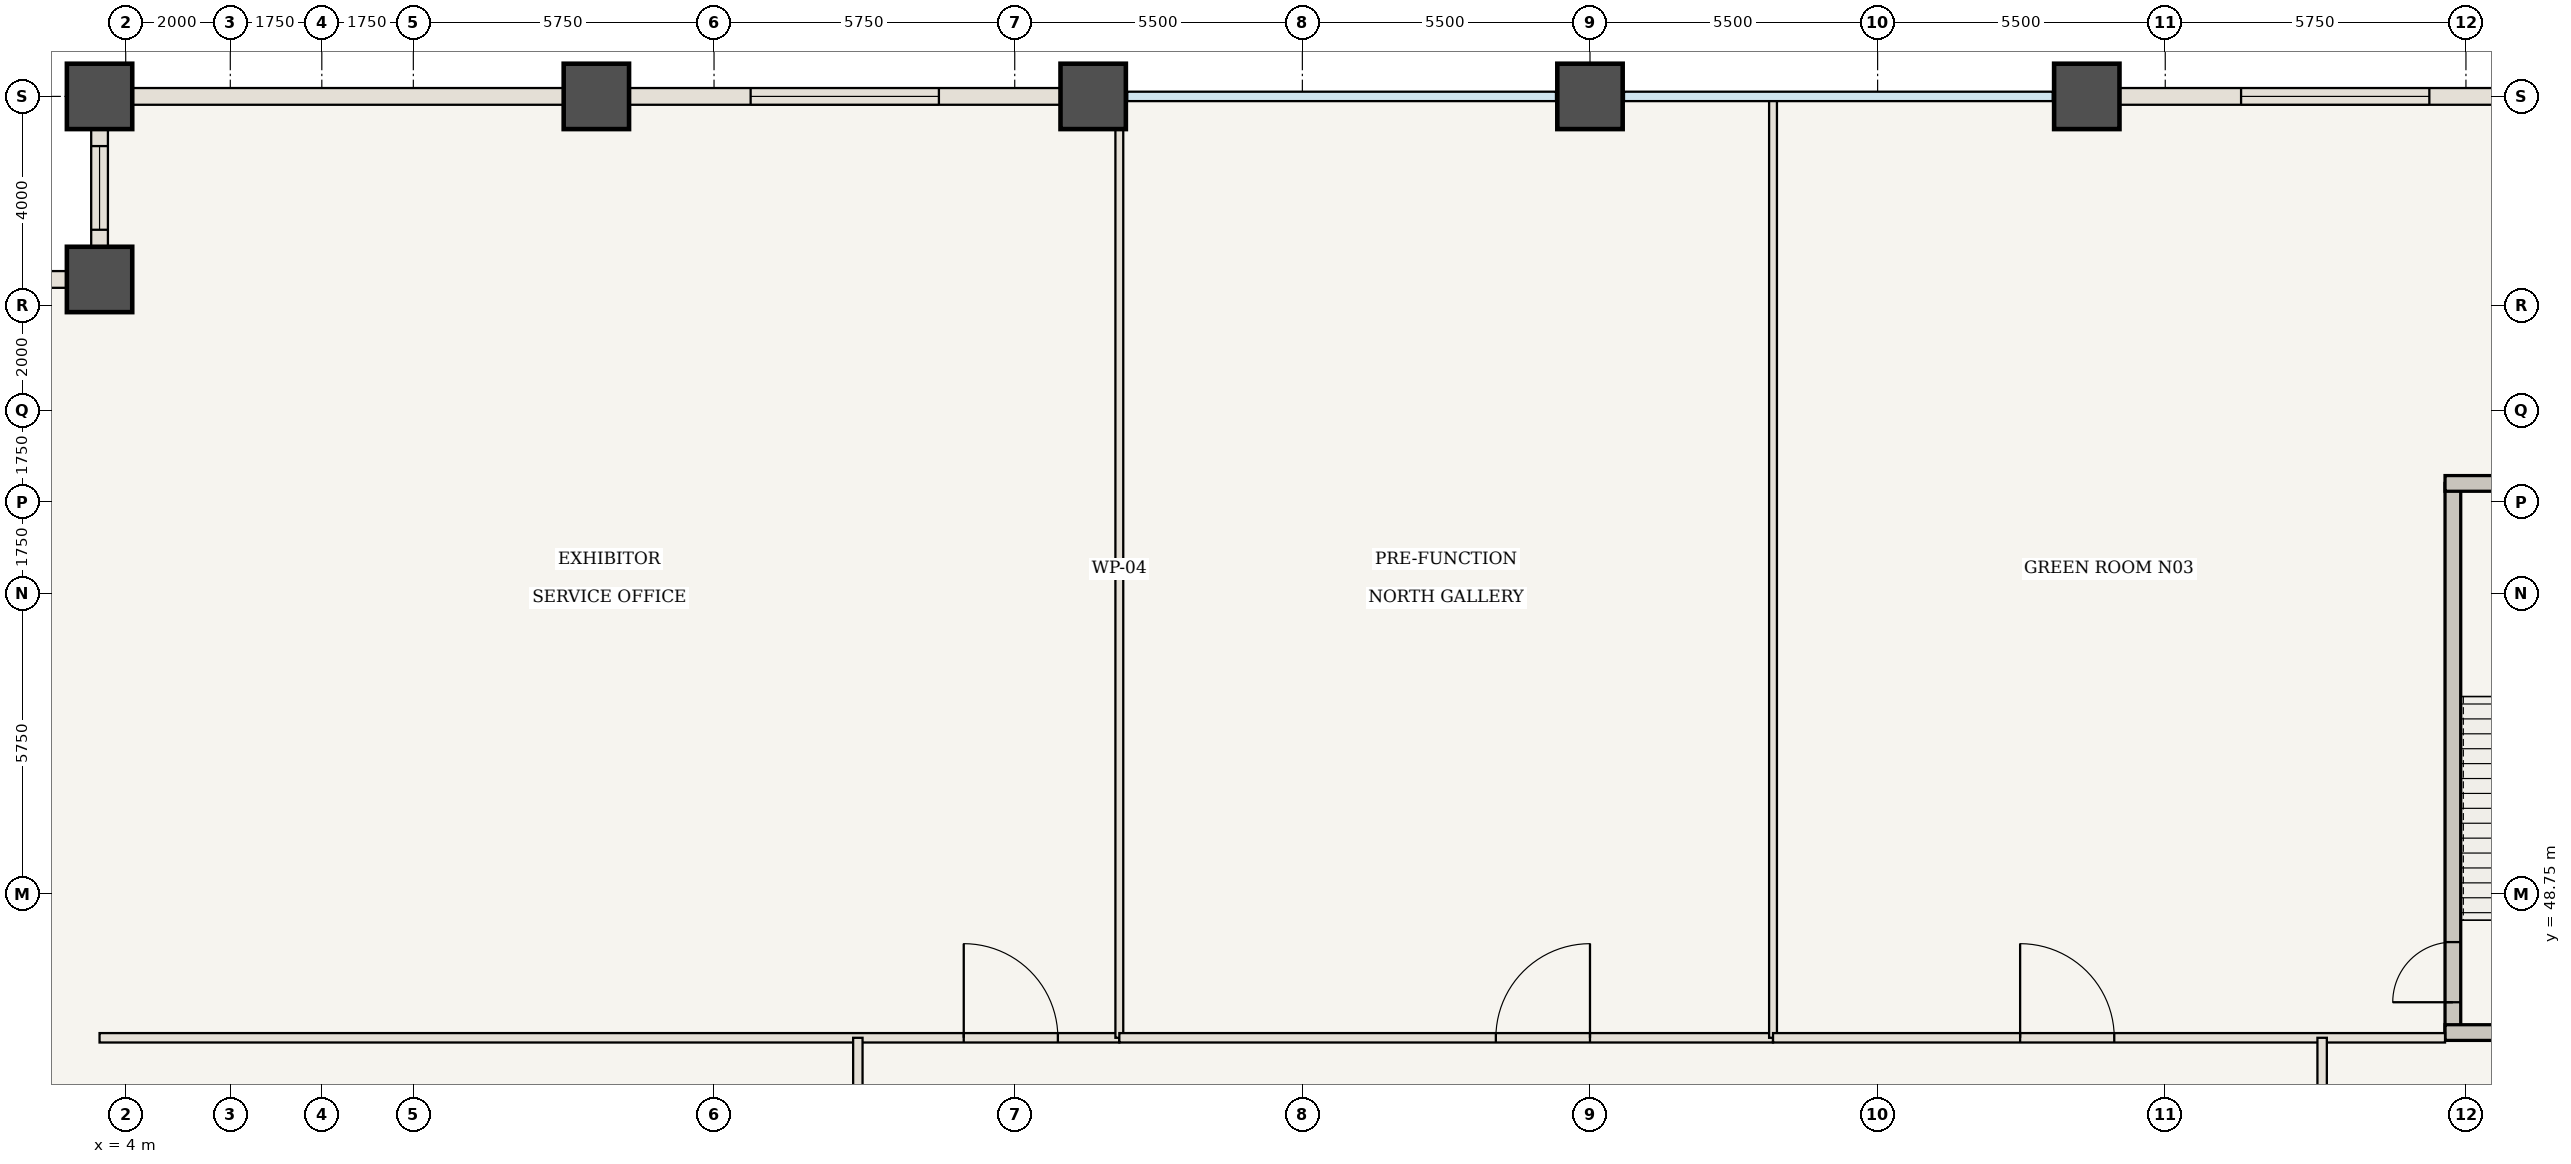
"""IFC4 building model, lengths in metres.
Left out: names, types, materials, properties, quantities, classifications, styles, units other than length and angle.
Written with IfcOpenShell. Run it as: python <this file> out.ifc"""

import sys

from ifc_helpers import new_model, si_unit, direction, frame, frame_2d, origin, origin_2d, place, context, subcontext, project, spatial, rectangle, extrude, element, fill, save


model = new_model("IFC4")
c1 = context("Model", 3, precision=1e-05, world=origin(), true_north=direction((0.0, 1.0)))
c2 = subcontext(c1, "Body", "Model", "MODEL_VIEW")
j1 = project(units=[si_unit("LENGTHUNIT", "METRE"), si_unit("PLANEANGLEUNIT", "RADIAN")], contexts=[c1])
p1 = place(None, origin())
s1 = spatial("IfcSite", under=j1, at=p1, CompositionType="ELEMENT")
p2 = place(p1, origin())
s2 = spatial("IfcBuilding", under=s1, at=p2, CompositionType="ELEMENT")
p3 = place(p2, frame((0.0, 0.0, 6.65)))
s3 = spatial("IfcBuildingStorey", under=s2, at=p3, CompositionType="ELEMENT", Elevation=6.65)
for number, where, z_axis, x_axis in (
    (1, (3.5, 64.0, 0.0), (0.0, 0.0, 1.0), (1.0, 0.0, 0.0)),
    (2, (3.5, 60.5, 0.0), (0.0, 0.0, 1.0), (1.0, 0.0, 0.0)),
    (3, (13.0, 64.0, 0.0), (0.0, 0.0, 1.0), (1.0, 0.0, 0.0)),
    (4, (22.5, 64.0, 0.0), (0.0, 0.0, 1.0), (1.0, 0.0, 0.0)),
    (5, (32.0, 64.0, 0.0), (0.0, 0.0, 1.0), (1.0, 0.0, 0.0)),
    (6, (41.5, 64.0, 0.0), (0.0, 0.0, 1.0), (1.0, 0.0, 0.0)),
):
    element("IfcColumn", number, at=place(p3, frame(where, z_axis=z_axis, x_axis=x_axis)), inside=s3, PredefinedType="COLUMN", context=c2, shape_type="SweptSolid", body=[
        extrude(rectangle(XDim=1.25, YDim=1.25, at=origin_2d()), origin(), (0.0, 0.0, 1.0), 5.6),
    ])
p4 = place(p3, frame((48.5, 46.1, 0.0), z_axis=(0.0, 0.0, 1.0), x_axis=(0.0, 1.0, 0.0)))
e7 = element("IfcWall", 7, at=p4, inside=s3, PredefinedType="SHEAR", context=c2, shape_type="SweptSolid", body=[
    extrude(rectangle(XDim=10.5, YDim=0.3, at=frame_2d((5.25, 0.0))), origin(), (0.0, 0.0, 1.0), 5.36),
])
p5 = place(p4, frame((0.58, 0.0, 0.0)))
e8 = element("IfcOpeningElement", 8, at=p5, cuts=e7, PredefinedType="OPENING", context=c2, shape_type="SweptSolid", body=[
    extrude(rectangle(XDim=1.15, YDim=2.15, at=frame_2d((0.575, 1.075))), frame((0.0, 0.16, 0.0), z_axis=(0.0, -1.0, 0.0), x_axis=(1.0, 0.0, 0.0)), (0.0, 0.0, 1.0), 0.32),
])
for number, where, z_axis, x_axis in (
    (9, (48.35, 46.1, 0.0), (0.0, 0.0, 1.0), (1.0, 0.0, 0.0)),
    (10, (48.35, 56.6, 0.0), (0.0, 0.0, 1.0), (1.0, 0.0, 0.0)),
):
    element("IfcWall", number, at=place(p3, frame(where, z_axis=z_axis, x_axis=x_axis)), inside=s3, PredefinedType="SHEAR", context=c2, shape_type="SweptSolid", body=[
        extrude(rectangle(XDim=4.75, YDim=0.3, at=frame_2d((2.375, 0.0))), origin(), (0.0, 0.0, 1.0), 5.36),
    ])
p6 = place(p3, frame((3.5, 46.0, 0.0), z_axis=(0.0, 0.0, 1.0), x_axis=(1.0, 0.0, 0.0)))
e11 = element("IfcWall", 11, at=p6, inside=s3, PredefinedType="STANDARD", context=c2, shape_type="SweptSolid", body=[
    extrude(rectangle(XDim=19.5, YDim=0.18, at=frame_2d((9.75, 0.0))), origin(), (0.0, 0.0, 1.0), 5.36),
])
p7 = place(p6, frame((16.525, 0.0, 0.0)))
e12 = element("IfcOpeningElement", 12, at=p7, cuts=e11, PredefinedType="OPENING", context=c2, shape_type="SweptSolid", body=[
    extrude(rectangle(XDim=1.8, YDim=2.35, at=frame_2d((0.9, 1.175))), frame((0.0, 0.1, 0.0), z_axis=(0.0, -1.0, 0.0), x_axis=(1.0, 0.0, 0.0)), (0.0, 0.0, 1.0), 0.2),
])
p8 = place(p3, frame((23.0, 46.0, 0.0), z_axis=(0.0, 0.0, 1.0), x_axis=(0.0, 1.0, 0.0)))
e13 = element("IfcWall", 13, at=p8, inside=s3, PredefinedType="STANDARD", context=c2, shape_type="SweptSolid", body=[
    extrude(rectangle(XDim=17.94, YDim=0.15, at=frame_2d((8.97, 0.0))), origin(), (0.0, 0.0, 1.0), 5.36),
])
p9 = place(p3, frame((23.0, 46.0, 0.0), z_axis=(0.0, 0.0, 1.0), x_axis=(1.0, 0.0, 0.0)))
e14 = element("IfcWall", 14, at=p9, inside=s3, PredefinedType="STANDARD", context=c2, shape_type="SweptSolid", body=[
    extrude(rectangle(XDim=12.5, YDim=0.18, at=frame_2d((6.25, 0.0))), origin(), (0.0, 0.0, 1.0), 5.36),
])
p10 = place(p9, frame((7.2, 0.0, 0.0)))
e15 = element("IfcOpeningElement", 15, at=p10, cuts=e14, PredefinedType="OPENING", context=c2, shape_type="SweptSolid", body=[
    extrude(rectangle(XDim=1.8, YDim=2.35, at=frame_2d((0.9, 1.175))), frame((0.0, 0.1, 0.0), z_axis=(0.0, -1.0, 0.0), x_axis=(1.0, 0.0, 0.0)), (0.0, 0.0, 1.0), 0.2),
])
p11 = place(p3, frame((35.5, 46.0, 0.0), z_axis=(0.0, 0.0, 1.0), x_axis=(0.0, 1.0, 0.0)))
e16 = element("IfcWall", 16, at=p11, inside=s3, PredefinedType="STANDARD", context=c2, shape_type="SweptSolid", body=[
    extrude(rectangle(XDim=17.94, YDim=0.15, at=frame_2d((8.97, 0.0))), origin(), (0.0, 0.0, 1.0), 5.36),
])
p12 = place(p3, frame((35.5, 46.0, 0.0), z_axis=(0.0, 0.0, 1.0), x_axis=(1.0, 0.0, 0.0)))
e17 = element("IfcWall", 17, at=p12, inside=s3, PredefinedType="STANDARD", context=c2, shape_type="SweptSolid", body=[
    extrude(rectangle(XDim=12.85, YDim=0.18, at=frame_2d((6.425, 0.0))), origin(), (0.0, 0.0, 1.0), 5.36),
])
p13 = place(p12, frame((4.725, 0.0, 0.0)))
e18 = element("IfcOpeningElement", 18, at=p13, cuts=e17, PredefinedType="OPENING", context=c2, shape_type="SweptSolid", body=[
    extrude(rectangle(XDim=1.8, YDim=2.35, at=frame_2d((0.9, 1.175))), frame((0.0, 0.1, 0.0), z_axis=(0.0, -1.0, 0.0), x_axis=(1.0, 0.0, 0.0)), (0.0, 0.0, 1.0), 0.2),
])
p14 = place(p3, frame((18.0, 31.2, 0.0), z_axis=(0.0, 0.0, 1.0), x_axis=(0.0, 1.0, 0.0)))
e19 = element("IfcWall", 19, at=p14, inside=s3, PredefinedType="STANDARD", context=c2, shape_type="SweptSolid", body=[
    extrude(rectangle(XDim=14.8, YDim=0.18, at=frame_2d((7.4, 0.0))), origin(), (0.0, 0.0, 1.0), 5.36),
])
p15 = place(p14, frame((6.9, 0.0, 0.0)))
e20 = element("IfcOpeningElement", 20, at=p15, cuts=e19, PredefinedType="OPENING", context=c2, shape_type="SweptSolid", body=[
    extrude(rectangle(XDim=0.95, YDim=2.15, at=frame_2d((0.475, 1.075))), frame((0.0, 0.1, 0.0), z_axis=(0.0, -1.0, 0.0), x_axis=(1.0, 0.0, 0.0)), (0.0, 0.0, 1.0), 0.2),
])
p16 = place(p3, frame((46.0, 32.8, 0.0), z_axis=(0.0, 0.0, 1.0), x_axis=(0.0, 1.0, 0.0)))
e21 = element("IfcWall", 21, at=p16, inside=s3, PredefinedType="STANDARD", context=c2, shape_type="SweptSolid", body=[
    extrude(rectangle(XDim=13.2, YDim=0.18, at=frame_2d((6.6, 0.0))), origin(), (0.0, 0.0, 1.0), 5.36),
])
p17 = place(p16, frame((6.1, 0.0, 0.0)))
e22 = element("IfcOpeningElement", 22, at=p17, cuts=e21, PredefinedType="OPENING", context=c2, shape_type="SweptSolid", body=[
    extrude(rectangle(XDim=0.95, YDim=2.15, at=frame_2d((0.475, 1.075))), frame((0.0, 0.1, 0.0), z_axis=(0.0, -1.0, 0.0), x_axis=(1.0, 0.0, 0.0)), (0.0, 0.0, 1.0), 0.2),
])
p18 = place(p3, frame((3.5, 64.0, 0.0), z_axis=(0.0, 0.0, 1.0), x_axis=(1.0, 0.0, 0.0)))
e23 = element("IfcWall", 23, at=p18, inside=s3, PredefinedType="USERDEFINED", context=c2, shape_type="SweptSolid", body=[
    extrude(rectangle(XDim=9.5, YDim=0.32, at=frame_2d((4.75, 0.0))), origin(), (0.0, 0.0, 1.0), 4.46),
])
p19 = place(p3, frame((13.0, 64.0, 0.0), z_axis=(0.0, 0.0, 1.0), x_axis=(1.0, 0.0, 0.0)))
e24 = element("IfcWall", 24, at=p19, inside=s3, PredefinedType="USERDEFINED", context=c2, shape_type="SweptSolid", body=[
    extrude(rectangle(XDim=9.5, YDim=0.32, at=frame_2d((4.75, 0.0))), origin(), (0.0, 0.0, 1.0), 4.46),
])
p20 = place(p19, frame((2.95, 0.0, 0.85)))
e25 = element("IfcOpeningElement", 25, at=p20, cuts=e24, PredefinedType="OPENING", context=c2, shape_type="SweptSolid", body=[
    extrude(rectangle(XDim=3.6, YDim=2.6, at=frame_2d((1.8, 1.3))), frame((0.0, 0.17, 0.0), z_axis=(0.0, -1.0, 0.0), x_axis=(1.0, 0.0, 0.0)), (0.0, 0.0, 1.0), 0.34),
])
p21 = place(p3, frame((41.5, 64.0, 0.0), z_axis=(0.0, 0.0, 1.0), x_axis=(1.0, 0.0, 0.0)))
e26 = element("IfcWall", 26, at=p21, inside=s3, PredefinedType="USERDEFINED", context=c2, shape_type="SweptSolid", body=[
    extrude(rectangle(XDim=9.5, YDim=0.32, at=frame_2d((4.75, 0.0))), origin(), (0.0, 0.0, 1.0), 4.46),
])
p22 = place(p21, frame((2.95, 0.0, 0.85)))
e27 = element("IfcOpeningElement", 27, at=p22, cuts=e26, PredefinedType="OPENING", context=c2, shape_type="SweptSolid", body=[
    extrude(rectangle(XDim=3.6, YDim=2.6, at=frame_2d((1.8, 1.3))), frame((0.0, 0.17, 0.0), z_axis=(0.0, -1.0, 0.0), x_axis=(1.0, 0.0, 0.0)), (0.0, 0.0, 1.0), 0.34),
])
p23 = place(p3, frame((3.5, 60.5, 0.0), z_axis=(0.0, 0.0, 1.0), x_axis=(0.0, 1.0, 0.0)))
e28 = element("IfcWall", 28, at=p23, inside=s3, PredefinedType="USERDEFINED", context=c2, shape_type="SweptSolid", body=[
    extrude(rectangle(XDim=3.5, YDim=0.32, at=frame_2d((1.75, 0.0))), origin(), (0.0, 0.0, 1.0), 4.46),
])
p24 = place(p23, frame((0.95, 0.0, 0.85)))
e29 = element("IfcOpeningElement", 29, at=p24, cuts=e28, PredefinedType="OPENING", context=c2, shape_type="SweptSolid", body=[
    extrude(rectangle(XDim=1.6, YDim=2.05, at=frame_2d((0.8, 1.025))), frame((0.0, 0.17, 0.0), z_axis=(0.0, -1.0, 0.0), x_axis=(1.0, 0.0, 0.0)), (0.0, 0.0, 1.0), 0.34),
])
p25 = place(p3, frame((0.0, 60.5, 0.0), z_axis=(0.0, 0.0, 1.0), x_axis=(1.0, 0.0, 0.0)))
e30 = element("IfcWall", 30, at=p25, inside=s3, PredefinedType="USERDEFINED", context=c2, shape_type="SweptSolid", body=[
    extrude(rectangle(XDim=3.5, YDim=0.32, at=frame_2d((1.75, 0.0))), origin(), (0.0, 0.0, 1.0), 4.46),
])
p26 = place(p25, frame((0.95, 0.0, 0.85)))
e31 = element("IfcOpeningElement", 31, at=p26, cuts=e30, PredefinedType="OPENING", context=c2, shape_type="SweptSolid", body=[
    extrude(rectangle(XDim=1.6, YDim=2.05, at=frame_2d((0.8, 1.025))), frame((0.0, 0.17, 0.0), z_axis=(0.0, -1.0, 0.0), x_axis=(1.0, 0.0, 0.0)), (0.0, 0.0, 1.0), 0.34),
])
p27 = place(p5, origin())
e32 = element("IfcDoor", 32, at=p27, inside=s3, OperationType="SINGLE_SWING_LEFT", PredefinedType="DOOR", context=c2, shape_type="SweptSolid", body=[
    extrude(rectangle(XDim=1.15, YDim=2.15, at=frame_2d((0.575, 1.075))), frame((0.0, 0.025, 0.0), z_axis=(0.0, -1.0, 0.0), x_axis=(1.0, 0.0, 0.0)), (0.0, 0.0, 1.0), 0.05),
])
fill(e8, e32)
p28 = place(p7, origin())
e33 = element("IfcDoor", 33, at=p28, inside=s3, OperationType="SINGLE_SWING_LEFT", PredefinedType="DOOR", context=c2, shape_type="SweptSolid", body=[
    extrude(rectangle(XDim=1.8, YDim=2.35, at=frame_2d((0.9, 1.175))), frame((0.0, 0.025, 0.0), z_axis=(0.0, -1.0, 0.0), x_axis=(1.0, 0.0, 0.0)), (0.0, 0.0, 1.0), 0.05),
])
fill(e12, e33)
p29 = place(p10, origin())
e34 = element("IfcDoor", 34, at=p29, inside=s3, OperationType="SINGLE_SWING_RIGHT", PredefinedType="DOOR", context=c2, shape_type="SweptSolid", body=[
    extrude(rectangle(XDim=1.8, YDim=2.35, at=frame_2d((0.9, 1.175))), frame((0.0, 0.025, 0.0), z_axis=(0.0, -1.0, 0.0), x_axis=(1.0, 0.0, 0.0)), (0.0, 0.0, 1.0), 0.05),
])
fill(e15, e34)
p30 = place(p13, origin())
e35 = element("IfcDoor", 35, at=p30, inside=s3, OperationType="SINGLE_SWING_LEFT", PredefinedType="DOOR", context=c2, shape_type="SweptSolid", body=[
    extrude(rectangle(XDim=1.8, YDim=2.35, at=frame_2d((0.9, 1.175))), frame((0.0, 0.025, 0.0), z_axis=(0.0, -1.0, 0.0), x_axis=(1.0, 0.0, 0.0)), (0.0, 0.0, 1.0), 0.05),
])
fill(e18, e35)
p31 = place(p20, origin())
e36 = element("IfcWindow", 36, at=p31, inside=s3, PartitioningType="SINGLE_PANEL", PredefinedType="WINDOW", context=c2, shape_type="SweptSolid", body=[
    extrude(rectangle(XDim=3.6, YDim=2.6, at=frame_2d((1.8, 1.3))), frame((0.0, 0.03, 0.0), z_axis=(0.0, -1.0, 0.0), x_axis=(1.0, 0.0, 0.0)), (0.0, 0.0, 1.0), 0.06),
])
fill(e25, e36)
p32 = place(p22, origin())
e37 = element("IfcWindow", 37, at=p32, inside=s3, PartitioningType="SINGLE_PANEL", PredefinedType="WINDOW", context=c2, shape_type="SweptSolid", body=[
    extrude(rectangle(XDim=3.6, YDim=2.6, at=frame_2d((1.8, 1.3))), frame((0.0, 0.03, 0.0), z_axis=(0.0, -1.0, 0.0), x_axis=(1.0, 0.0, 0.0)), (0.0, 0.0, 1.0), 0.06),
])
fill(e27, e37)
p33 = place(p24, origin())
e38 = element("IfcWindow", 38, at=p33, inside=s3, PartitioningType="SINGLE_PANEL", PredefinedType="WINDOW", context=c2, shape_type="SweptSolid", body=[
    extrude(rectangle(XDim=1.6, YDim=2.05, at=frame_2d((0.8, 1.025))), frame((0.0, 0.03, 0.0), z_axis=(0.0, -1.0, 0.0), x_axis=(1.0, 0.0, 0.0)), (0.0, 0.0, 1.0), 0.06),
])
fill(e29, e38)
save(model, sys.argv[1])
